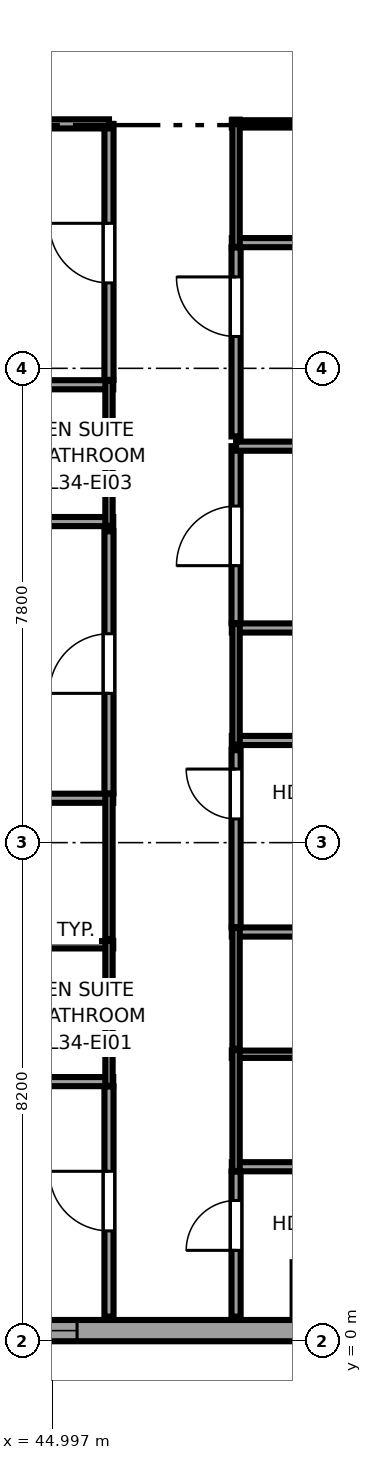
"""IFC4 building model, lengths in metres.
Left out: names, types, materials, properties, quantities, classifications, styles, units other than length and angle.
Written with IfcOpenShell. Run it as: python <this file> out.ifc"""

import sys

from ifc_helpers import new_model, si_unit, direction, frame, frame_2d, origin, place, context, subcontext, project, spatial, rectangle, extrude, source, transform, mapped, element, fill, save


model = new_model("IFC4")
c1 = context("Model", 3, precision=1e-05, world=origin(), true_north=direction((0.0, 1.0)))
c2 = subcontext(c1, "Body", "Model", "MODEL_VIEW")
j1 = project(units=[si_unit("LENGTHUNIT", "METRE"), si_unit("PLANEANGLEUNIT", "RADIAN")], contexts=[c1])
p1 = place(None, origin())
s1 = spatial("IfcSite", under=j1, at=p1, CompositionType="ELEMENT")
p2 = place(p1, origin())
s2 = spatial("IfcBuilding", under=s1, at=p2, CompositionType="ELEMENT")
p3 = place(p2, frame((0.0, 0.0, 132.85)))
s3 = spatial("IfcBuildingStorey", under=s2, at=p3, CompositionType="ELEMENT", Elevation=132.85)
p4 = place(p3, frame((34.375, 0.175, 0.0), z_axis=(0.0, 0.0, 1.0), x_axis=(1.0, 0.0, 0.0)))
e1 = element("IfcWall", 1, at=p4, inside=s3, PredefinedType="SOLIDWALL", context=c2, shape_type="SweptSolid", body=[
    extrude(rectangle(XDim=18.008, YDim=0.35, at=frame_2d((9.004, 0.0))), origin(), (0.0, 0.0, 1.0), 3.37),
])
p5 = place(p4, frame((1.726, 0.0, 0.68)))
e2 = element("IfcOpeningElement", 2, at=p5, cuts=e1, PredefinedType="OPENING", context=c2, shape_type="SweptSolid", body=[
    extrude(rectangle(XDim=1.95, YDim=1.82, at=frame_2d((0.975, 0.91))), frame((0.0, 0.185, 0.0), z_axis=(0.0, -1.0, 0.0), x_axis=(1.0, 0.0, 0.0)), (0.0, 0.0, 1.0), 0.37),
])
p6 = place(p4, frame((9.08, 0.0, 0.68)))
e3 = element("IfcOpeningElement", 3, at=p6, cuts=e1, PredefinedType="OPENING", context=c2, shape_type="SweptSolid", body=[
    extrude(rectangle(XDim=1.95, YDim=1.82, at=frame_2d((0.975, 0.91))), frame((0.0, 0.185, 0.0), z_axis=(0.0, -1.0, 0.0), x_axis=(1.0, 0.0, 0.0)), (0.0, 0.0, 1.0), 0.37),
])
p7 = place(p4, frame((14.991, 0.0, 0.62)))
e4 = element("IfcOpeningElement", 4, at=p7, cuts=e1, PredefinedType="OPENING", context=c2, shape_type="SweptSolid", body=[
    extrude(rectangle(XDim=1.5, YDim=1.55, at=frame_2d((0.75, 0.775))), frame((0.0, 0.185, 0.0), z_axis=(0.0, -1.0, 0.0), x_axis=(1.0, 0.0, 0.0)), (0.0, 0.0, 1.0), 0.37),
])
p8 = place(p3, frame((43.41, 4.27, 0.0), z_axis=(0.0, 0.0, 1.0), x_axis=(1.0, 0.0, 0.0)))
e5 = element("IfcWall", 5, at=p8, inside=s3, PredefinedType="PARTITIONING", context=c2, shape_type="SweptSolid", body=[
    extrude(rectangle(XDim=2.59, YDim=0.15, at=frame_2d((1.295, 0.0))), origin(), (0.0, 0.0, 1.0), 3.37),
])
p9 = place(p3, frame((43.41, 6.52, 0.0), z_axis=(0.0, 0.0, 1.0), x_axis=(1.0, 0.0, 0.0)))
e6 = element("IfcWall", 6, at=p9, inside=s3, PredefinedType="PLUMBINGWALL", context=c2, shape_type="SweptSolid", body=[
    extrude(rectangle(XDim=2.59, YDim=0.12, at=frame_2d((1.295, 0.0))), origin(), (0.0, 0.0, 1.0), 3.37),
])
p10 = place(p3, frame((45.93, 4.2, 0.0), z_axis=(0.0, 0.0, 1.0), x_axis=(0.0, 1.0, 0.0)))
e7 = element("IfcWall", 7, at=p10, inside=s3, PredefinedType="PLUMBINGWALL", context=c2, shape_type="SweptSolid", body=[
    extrude(rectangle(XDim=2.39, YDim=0.12, at=frame_2d((1.195, 0.0))), origin(), (0.0, 0.0, 1.0), 3.37),
])
p11 = place(p3, frame((43.41, 8.93, 0.0), z_axis=(0.0, 0.0, 1.0), x_axis=(1.0, 0.0, 0.0)))
e8 = element("IfcWall", 8, at=p11, inside=s3, PredefinedType="PARTITIONING", context=c2, shape_type="SweptSolid", body=[
    extrude(rectangle(XDim=2.59, YDim=0.15, at=frame_2d((1.295, 0.0))), origin(), (0.0, 0.0, 1.0), 3.37),
])
p12 = place(p3, frame((45.93, 6.61, 0.0), z_axis=(0.0, 0.0, 1.0), x_axis=(0.0, 1.0, 0.0)))
e9 = element("IfcWall", 9, at=p12, inside=s3, PredefinedType="PLUMBINGWALL", context=c2, shape_type="SweptSolid", body=[
    extrude(rectangle(XDim=2.39, YDim=0.12, at=frame_2d((1.195, 0.0))), origin(), (0.0, 0.0, 1.0), 3.37),
])
p13 = place(p3, frame((34.65, 13.48, 0.0), z_axis=(0.0, 0.0, 1.0), x_axis=(1.0, 0.0, 0.0)))
e10 = element("IfcWall", 10, at=p13, inside=s3, PredefinedType="PARTITIONING", context=c2, shape_type="SweptSolid", body=[
    extrude(rectangle(XDim=11.35, YDim=0.15, at=frame_2d((5.675, 0.0))), origin(), (0.0, 0.0, 1.0), 3.37),
])
p14 = place(p3, frame((43.41, 15.73, 0.0), z_axis=(0.0, 0.0, 1.0), x_axis=(1.0, 0.0, 0.0)))
e11 = element("IfcWall", 11, at=p14, inside=s3, PredefinedType="PARTITIONING", context=c2, shape_type="SweptSolid", body=[
    extrude(rectangle(XDim=2.59, YDim=0.15, at=frame_2d((1.295, 0.0))), origin(), (0.0, 0.0, 1.0), 3.37),
])
p15 = place(p3, frame((45.93, 13.41, 0.0), z_axis=(0.0, 0.0, 1.0), x_axis=(0.0, 1.0, 0.0)))
e12 = element("IfcWall", 12, at=p15, inside=s3, PredefinedType="PLUMBINGWALL", context=c2, shape_type="SweptSolid", body=[
    extrude(rectangle(XDim=2.39, YDim=0.12, at=frame_2d((1.195, 0.0))), origin(), (0.0, 0.0, 1.0), 3.37),
])
p16 = place(p3, frame((47.95, 2.87, 0.0), z_axis=(0.0, 0.0, 1.0), x_axis=(1.0, 0.0, 0.0)))
e13 = element("IfcWall", 13, at=p16, inside=s3, PredefinedType="PARTITIONING", context=c2, shape_type="SweptSolid", body=[
    extrude(rectangle(XDim=2.59, YDim=0.15, at=frame_2d((1.295, 0.0))), origin(), (0.0, 0.0, 1.0), 3.37),
])
p17 = place(p3, frame((47.95, 4.72, 0.0), z_axis=(0.0, 0.0, 1.0), x_axis=(1.0, 0.0, 0.0)))
e14 = element("IfcWall", 14, at=p17, inside=s3, PredefinedType="PLUMBINGWALL", context=c2, shape_type="SweptSolid", body=[
    extrude(rectangle(XDim=2.59, YDim=0.12, at=frame_2d((1.295, 0.0))), origin(), (0.0, 0.0, 1.0), 3.37),
])
p18 = place(p3, frame((48.02, 2.8, 0.0), z_axis=(0.0, 0.0, 1.0), x_axis=(0.0, 1.0, 0.0)))
e15 = element("IfcWall", 15, at=p18, inside=s3, PredefinedType="PLUMBINGWALL", context=c2, shape_type="SweptSolid", body=[
    extrude(rectangle(XDim=1.99, YDim=0.12, at=frame_2d((0.995, 0.0))), origin(), (0.0, 0.0, 1.0), 3.37),
])
p19 = place(p3, frame((47.95, 6.73, 0.0), z_axis=(0.0, 0.0, 1.0), x_axis=(1.0, 0.0, 0.0)))
e16 = element("IfcWall", 16, at=p19, inside=s3, PredefinedType="PARTITIONING", context=c2, shape_type="SweptSolid", body=[
    extrude(rectangle(XDim=2.59, YDim=0.15, at=frame_2d((1.295, 0.0))), origin(), (0.0, 0.0, 1.0), 3.37),
])
p20 = place(p3, frame((48.02, 4.81, 0.0), z_axis=(0.0, 0.0, 1.0), x_axis=(0.0, 1.0, 0.0)))
e17 = element("IfcWall", 17, at=p20, inside=s3, PredefinedType="PLUMBINGWALL", context=c2, shape_type="SweptSolid", body=[
    extrude(rectangle(XDim=1.99, YDim=0.12, at=frame_2d((0.995, 0.0))), origin(), (0.0, 0.0, 1.0), 3.37),
])
p21 = place(p3, frame((47.95, 9.88, 0.0), z_axis=(0.0, 0.0, 1.0), x_axis=(1.0, 0.0, 0.0)))
e18 = element("IfcWall", 18, at=p21, inside=s3, PredefinedType="PARTITIONING", context=c2, shape_type="SweptSolid", body=[
    extrude(rectangle(XDim=8.645, YDim=0.15, at=frame_2d((4.323, 0.0))), origin(), (0.0, 0.0, 1.0), 3.37),
])
p22 = place(p3, frame((47.95, 11.73, 0.0), z_axis=(0.0, 0.0, 1.0), x_axis=(1.0, 0.0, 0.0)))
e19 = element("IfcWall", 19, at=p22, inside=s3, PredefinedType="PARTITIONING", context=c2, shape_type="SweptSolid", body=[
    extrude(rectangle(XDim=2.59, YDim=0.15, at=frame_2d((1.295, 0.0))), origin(), (0.0, 0.0, 1.0), 3.37),
])
p23 = place(p3, frame((48.02, 9.81, 0.0), z_axis=(0.0, 0.0, 1.0), x_axis=(0.0, 1.0, 0.0)))
e20 = element("IfcWall", 20, at=p23, inside=s3, PredefinedType="PLUMBINGWALL", context=c2, shape_type="SweptSolid", body=[
    extrude(rectangle(XDim=1.99, YDim=0.12, at=frame_2d((0.995, 0.0))), origin(), (0.0, 0.0, 1.0), 3.37),
])
p24 = place(p3, frame((47.95, 18.067, 0.0), z_axis=(0.0, 0.0, 1.0), x_axis=(1.0, 0.0, 0.0)))
e21 = element("IfcWall", 21, at=p24, inside=s3, PredefinedType="PARTITIONING", context=c2, shape_type="SweptSolid", body=[
    extrude(rectangle(XDim=2.59, YDim=0.15, at=frame_2d((1.295, 0.0))), origin(), (0.0, 0.0, 1.0), 3.37),
])
p25 = place(p3, frame((47.95, 20.02, 0.0), z_axis=(0.0, 0.0, 1.0), x_axis=(1.0, 0.0, 0.0)))
e22 = element("IfcWall", 22, at=p25, inside=s3, PredefinedType="PLUMBINGWALL", context=c2, shape_type="SweptSolid", body=[
    extrude(rectangle(XDim=2.59, YDim=0.12, at=frame_2d((1.295, 0.0))), origin(), (0.0, 0.0, 1.0), 3.37),
])
p26 = place(p3, frame((48.02, 17.997, 0.0), z_axis=(0.0, 0.0, 1.0), x_axis=(0.0, 1.0, 0.0)))
e23 = element("IfcWall", 23, at=p26, inside=s3, PredefinedType="PLUMBINGWALL", context=c2, shape_type="SweptSolid", body=[
    extrude(rectangle(XDim=2.093, YDim=0.12, at=frame_2d((1.046, 0.0))), origin(), (0.0, 0.0, 1.0), 3.37),
])
p27 = place(p3, frame((45.93, 0.405, 0.0), z_axis=(0.0, 0.0, 1.0), x_axis=(0.0, 1.0, 0.0)))
e24 = element("IfcWall", 24, at=p27, inside=s3, PredefinedType="PARTITIONING", context=c2, shape_type="SweptSolid", body=[
    extrude(rectangle(XDim=3.785, YDim=0.15, at=frame_2d((1.893, 0.0))), origin(), (0.0, 0.0, 1.0), 3.37),
])
p28 = place(p27, frame((1.41, 0.0, 0.0)))
e25 = element("IfcOpeningElement", 25, at=p28, cuts=e24, PredefinedType="OPENING", context=c2, shape_type="SweptSolid", body=[
    extrude(rectangle(XDim=0.98, YDim=2.12, at=frame_2d((0.49, 1.06))), frame((0.0, 0.085, 0.0), z_axis=(0.0, -1.0, 0.0), x_axis=(1.0, 0.0, 0.0)), (0.0, 0.0, 1.0), 0.17),
])
p29 = place(p3, frame((45.93, 9.01, 0.0), z_axis=(0.0, 0.0, 1.0), x_axis=(0.0, 1.0, 0.0)))
e26 = element("IfcWall", 26, at=p29, inside=s3, PredefinedType="PARTITIONING", context=c2, shape_type="SweptSolid", body=[
    extrude(rectangle(XDim=4.31, YDim=0.15, at=frame_2d((2.155, 0.0))), origin(), (0.0, 0.0, 1.0), 3.37),
])
p30 = place(p29, frame((1.645, 0.0, 0.0)))
e27 = element("IfcOpeningElement", 27, at=p30, cuts=e26, PredefinedType="OPENING", context=c2, shape_type="SweptSolid", body=[
    extrude(rectangle(XDim=0.98, YDim=2.12, at=frame_2d((0.49, 1.06))), frame((0.0, 0.085, 0.0), z_axis=(0.0, -1.0, 0.0), x_axis=(1.0, 0.0, 0.0)), (0.0, 0.0, 1.0), 0.17),
])
p31 = place(p3, frame((45.93, 15.81, 0.0), z_axis=(0.0, 0.0, 1.0), x_axis=(0.0, 1.0, 0.0)))
e28 = element("IfcWall", 28, at=p31, inside=s3, PredefinedType="PARTITIONING", context=c2, shape_type="SweptSolid", body=[
    extrude(rectangle(XDim=4.21, YDim=0.15, at=frame_2d((2.105, 0.0))), origin(), (0.0, 0.0, 1.0), 3.37),
])
p32 = place(p31, frame((1.595, 0.0, 0.0)))
e29 = element("IfcOpeningElement", 29, at=p32, cuts=e28, PredefinedType="OPENING", context=c2, shape_type="SweptSolid", body=[
    extrude(rectangle(XDim=0.98, YDim=2.12, at=frame_2d((0.49, 1.06))), frame((0.0, 0.085, 0.0), z_axis=(0.0, -1.0, 0.0), x_axis=(1.0, 0.0, 0.0)), (0.0, 0.0, 1.0), 0.17),
])
p33 = place(p3, frame((34.65, 20.02, 0.0), z_axis=(0.0, 0.0, 1.0), x_axis=(1.0, 0.0, 0.0)))
e30 = element("IfcWall", 30, at=p33, inside=s3, PredefinedType="PARTITIONING", context=c2, shape_type="SweptSolid", body=[
    extrude(rectangle(XDim=11.28, YDim=0.15, at=frame_2d((5.64, 0.0))), origin(), (0.0, 0.0, 1.0), 2.954),
])
p34 = place(p3, frame((48.02, 0.405, 0.0), z_axis=(0.0, 0.0, 1.0), x_axis=(0.0, 1.0, 0.0)))
e31 = element("IfcWall", 31, at=p34, inside=s3, PredefinedType="PARTITIONING", context=c2, shape_type="SweptSolid", body=[
    extrude(rectangle(XDim=2.385, YDim=0.15, at=frame_2d((1.192, 0.0))), origin(), (0.0, 0.0, 1.0), 3.37),
])
p35 = place(p34, frame((1.09, 0.0, 0.0)))
e32 = element("IfcOpeningElement", 32, at=p35, cuts=e31, PredefinedType="OPENING", context=c2, shape_type="SweptSolid", body=[
    extrude(rectangle(XDim=0.82, YDim=2.01, at=frame_2d((0.41, 1.005))), frame((0.0, 0.085, 0.0), z_axis=(0.0, -1.0, 0.0), x_axis=(1.0, 0.0, 0.0)), (0.0, 0.0, 1.0), 0.17),
])
p36 = place(p3, frame((48.02, 6.81, 0.0), z_axis=(0.0, 0.0, 1.0), x_axis=(0.0, 1.0, 0.0)))
e33 = element("IfcWall", 33, at=p36, inside=s3, PredefinedType="PARTITIONING", context=c2, shape_type="SweptSolid", body=[
    extrude(rectangle(XDim=2.91, YDim=0.15, at=frame_2d((1.455, 0.0))), origin(), (0.0, 0.0, 1.0), 3.37),
])
p37 = place(p36, frame((1.78, 0.0, 0.0)))
e34 = element("IfcOpeningElement", 34, at=p37, cuts=e33, PredefinedType="OPENING", context=c2, shape_type="SweptSolid", body=[
    extrude(rectangle(XDim=0.82, YDim=2.01, at=frame_2d((0.41, 1.005))), frame((0.0, 0.085, 0.0), z_axis=(0.0, -1.0, 0.0), x_axis=(1.0, 0.0, 0.0)), (0.0, 0.0, 1.0), 0.17),
])
p38 = place(p3, frame((48.02, 11.81, 0.0), z_axis=(0.0, 0.0, 1.0), x_axis=(0.0, 1.0, 0.0)))
e35 = element("IfcWall", 35, at=p38, inside=s3, PredefinedType="PARTITIONING", context=c2, shape_type="SweptSolid", body=[
    extrude(rectangle(XDim=2.91, YDim=0.15, at=frame_2d((1.455, 0.0))), origin(), (0.0, 0.0, 1.0), 3.37),
])
p39 = place(p38, frame((0.945, 0.0, 0.0)))
e36 = element("IfcOpeningElement", 36, at=p39, cuts=e35, PredefinedType="OPENING", context=c2, shape_type="SweptSolid", body=[
    extrude(rectangle(XDim=0.98, YDim=2.12, at=frame_2d((0.49, 1.06))), frame((0.0, 0.085, 0.0), z_axis=(0.0, -1.0, 0.0), x_axis=(1.0, 0.0, 0.0)), (0.0, 0.0, 1.0), 0.17),
])
p40 = place(p3, frame((48.02, 14.72, 0.0), z_axis=(0.0, 0.0, 1.0), x_axis=(1.0, 0.0, 0.0)))
e37 = element("IfcWall", 37, at=p40, inside=s3, PredefinedType="PARTITIONING", context=c2, shape_type="SweptSolid", body=[
    extrude(rectangle(XDim=8.575, YDim=0.15, at=frame_2d((4.288, 0.0))), origin(), (0.0, 0.0, 1.0), 3.37),
])
p41 = place(p3, frame((48.02, 14.88, 0.0), z_axis=(0.0, 0.0, 1.0), x_axis=(0.0, 1.0, 0.0)))
e38 = element("IfcWall", 38, at=p41, inside=s3, PredefinedType="PARTITIONING", context=c2, shape_type="SweptSolid", body=[
    extrude(rectangle(XDim=3.107, YDim=0.15, at=frame_2d((1.554, 0.0))), origin(), (0.0, 0.0, 1.0), 3.37),
])
p42 = place(p41, frame((1.644, 0.0, 0.0)))
e39 = element("IfcOpeningElement", 39, at=p42, cuts=e38, PredefinedType="OPENING", context=c2, shape_type="SweptSolid", body=[
    extrude(rectangle(XDim=0.98, YDim=2.12, at=frame_2d((0.49, 1.06))), frame((0.0, 0.085, 0.0), z_axis=(0.0, -1.0, 0.0), x_axis=(1.0, 0.0, 0.0)), (0.0, 0.0, 1.0), 0.17),
])
m1 = source(origin(), c2, "Body", "SweptSolid", [
    extrude(rectangle(XDim=1.95, YDim=1.82, at=frame_2d((0.975, 0.91))), frame((0.0, 0.09, 0.0), z_axis=(0.0, -1.0, 0.0), x_axis=(1.0, 0.0, 0.0)), (0.0, 0.0, 1.0), 0.06),
])
p43 = place(p6, origin())
e40 = element("IfcWindow", 40, at=p43, inside=s3, PartitioningType="DOUBLE_PANEL_VERTICAL", PredefinedType="WINDOW", context=c2, shape_type="MappedRepresentation", body=[
    mapped(m1, transform((0.0, 0.0, 0.0), x_axis=(1.0, 0.0, 0.0), y_axis=(0.0, 1.0, 0.0), z_axis=(0.0, 0.0, 1.0), scale=1.0)),
])
fill(e3, e40)
m2 = source(origin(), c2, "Body", "SweptSolid", [
    extrude(rectangle(XDim=0.98, YDim=2.12, at=frame_2d((0.49, 1.06))), frame((0.0, 0.025, 0.0), z_axis=(0.0, -1.0, 0.0), x_axis=(1.0, 0.0, 0.0)), (0.0, 0.0, 1.0), 0.05),
])
p44 = place(p28, origin())
e41 = element("IfcDoor", 41, at=p44, inside=s3, OperationType="SINGLE_SWING_RIGHT", PredefinedType="DOOR", context=c2, shape_type="MappedRepresentation", body=[
    mapped(m2, transform((0.0, 0.0, 0.0), x_axis=(1.0, 0.0, 0.0), y_axis=(0.0, 1.0, 0.0), z_axis=(0.0, 0.0, 1.0), scale=1.0)),
])
fill(e25, e41)
p45 = place(p30, origin())
e42 = element("IfcDoor", 42, at=p45, inside=s3, OperationType="SINGLE_SWING_LEFT", PredefinedType="DOOR", context=c2, shape_type="MappedRepresentation", body=[
    mapped(m2, transform((0.0, 0.0, 0.0), x_axis=(1.0, 0.0, 0.0), y_axis=(0.0, 1.0, 0.0), z_axis=(0.0, 0.0, 1.0), scale=1.0)),
])
fill(e27, e42)
p46 = place(p32, origin())
e43 = element("IfcDoor", 43, at=p46, inside=s3, OperationType="SINGLE_SWING_RIGHT", PredefinedType="DOOR", context=c2, shape_type="MappedRepresentation", body=[
    mapped(m2, transform((0.0, 0.0, 0.0), x_axis=(1.0, 0.0, 0.0), y_axis=(0.0, 1.0, 0.0), z_axis=(0.0, 0.0, 1.0), scale=1.0)),
])
fill(e29, e43)
m3 = source(origin(), c2, "Body", "SweptSolid", [
    extrude(rectangle(XDim=0.82, YDim=2.01, at=frame_2d((0.41, 1.005))), frame((0.0, 0.025, 0.0), z_axis=(0.0, -1.0, 0.0), x_axis=(1.0, 0.0, 0.0)), (0.0, 0.0, 1.0), 0.05),
])
p47 = place(p35, origin())
e44 = element("IfcDoor", 44, at=p47, inside=s3, OperationType="SINGLE_SWING_LEFT", PredefinedType="DOOR", context=c2, shape_type="MappedRepresentation", body=[
    mapped(m3, transform((0.0, 0.0, 0.0), x_axis=(1.0, 0.0, 0.0), y_axis=(0.0, 1.0, 0.0), z_axis=(0.0, 0.0, 1.0), scale=1.0)),
])
fill(e32, e44)
p48 = place(p37, origin())
e45 = element("IfcDoor", 45, at=p48, inside=s3, OperationType="SINGLE_SWING_RIGHT", PredefinedType="DOOR", context=c2, shape_type="MappedRepresentation", body=[
    mapped(m3, transform((0.0, 0.0, 0.0), x_axis=(1.0, 0.0, 0.0), y_axis=(0.0, 1.0, 0.0), z_axis=(0.0, 0.0, 1.0), scale=1.0)),
])
fill(e34, e45)
p49 = place(p39, origin())
e46 = element("IfcDoor", 46, at=p49, inside=s3, OperationType="SINGLE_SWING_LEFT", PredefinedType="DOOR", context=c2, shape_type="MappedRepresentation", body=[
    mapped(m2, transform((0.0, 0.0, 0.0), x_axis=(1.0, 0.0, 0.0), y_axis=(0.0, 1.0, 0.0), z_axis=(0.0, 0.0, 1.0), scale=1.0)),
])
fill(e36, e46)
p50 = place(p42, origin())
e47 = element("IfcDoor", 47, at=p50, inside=s3, OperationType="SINGLE_SWING_RIGHT", PredefinedType="DOOR", context=c2, shape_type="MappedRepresentation", body=[
    mapped(m2, transform((0.0, 0.0, 0.0), x_axis=(1.0, 0.0, 0.0), y_axis=(0.0, 1.0, 0.0), z_axis=(0.0, 0.0, 1.0), scale=1.0)),
])
fill(e39, e47)
save(model, sys.argv[1])
